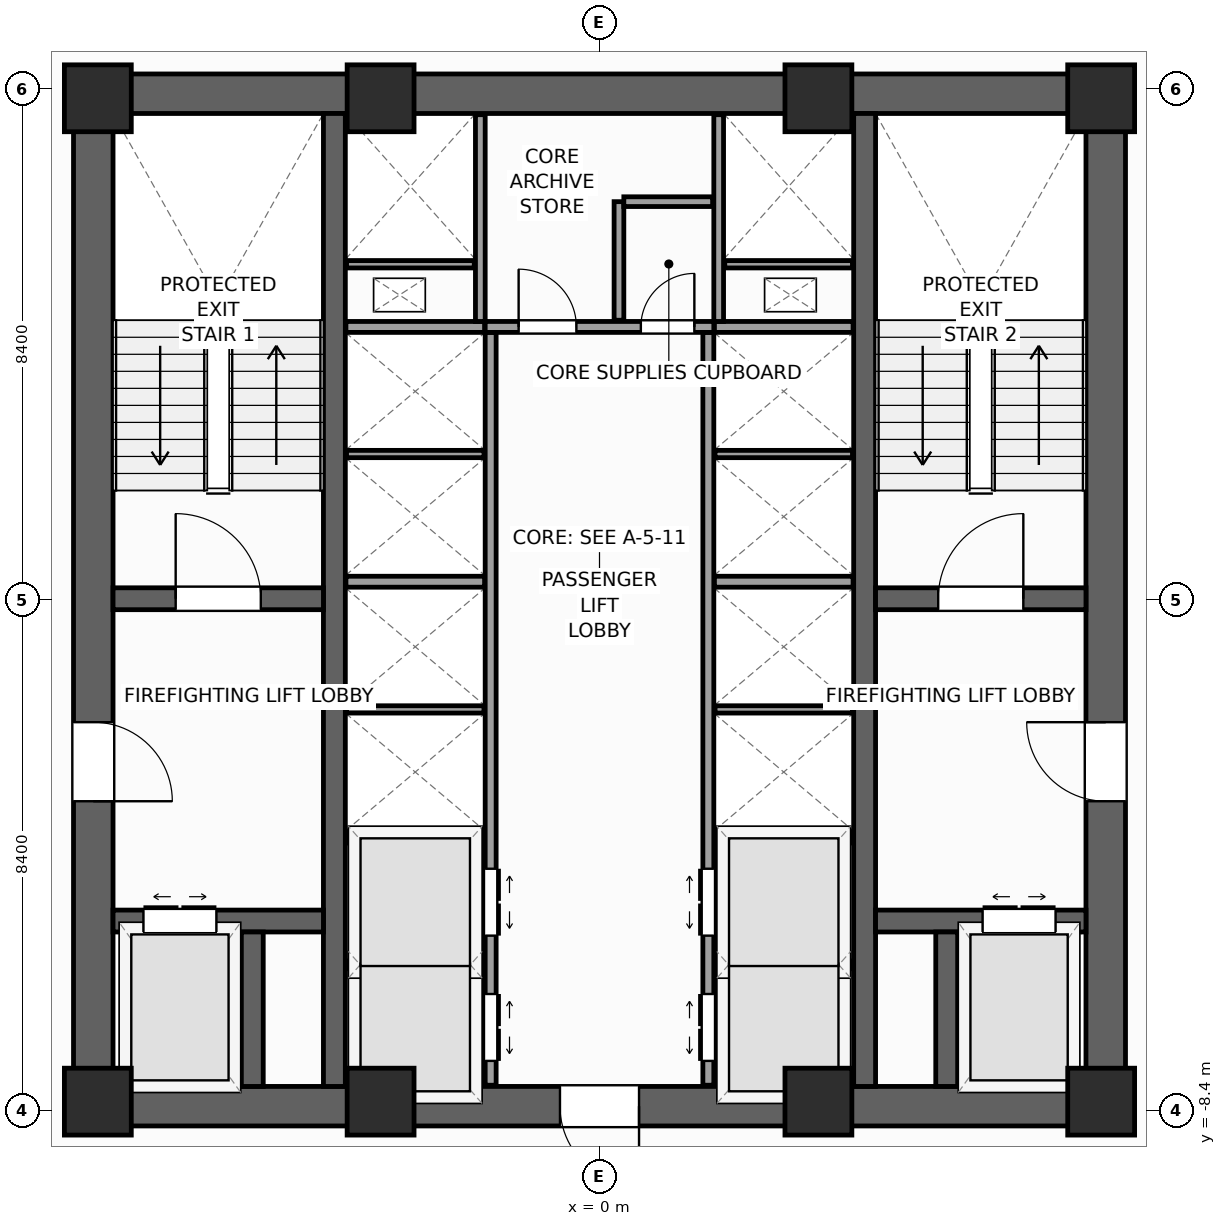
"""IFC4 building model, lengths in metres.
Left out: names, types, materials, properties, quantities, classifications, styles, units other than length and angle.
Written with IfcOpenShell. Run it as: python <this file> out.ifc"""

import sys

from ifc_helpers import new_model, si_unit, direction, frame, frame_2d, origin, origin_2d, place, context, subcontext, project, spatial, rectangle, extrude, source, transform, mapped, element, fill, save


model = new_model("IFC4")
c1 = context("Model", 3, precision=1e-05, world=origin(), true_north=direction((0.0, 1.0)))
c2 = subcontext(c1, "Body", "Model", "MODEL_VIEW")
j1 = project(units=[si_unit("LENGTHUNIT", "METRE"), si_unit("PLANEANGLEUNIT", "RADIAN")], contexts=[c1])
p1 = place(None, origin())
s1 = spatial("IfcSite", under=j1, at=p1, CompositionType="ELEMENT")
p2 = place(p1, origin())
s2 = spatial("IfcBuilding", under=s1, at=p2, CompositionType="ELEMENT")
p3 = place(p2, frame((0.0, 0.0, 95.2)))
s3 = spatial("IfcBuildingStorey", under=s2, at=p3, CompositionType="ELEMENT", Elevation=95.2)
p4 = place(p3, frame((-8.65, -8.325, 0.0), z_axis=(0.0, 0.0, 1.0), x_axis=(1.0, 0.0, 0.0)))
e1 = element("IfcWall", 1, at=p4, inside=s3, PredefinedType="SHEAR", context=c2, shape_type="SweptSolid", body=[
    extrude(rectangle(XDim=17.3, YDim=0.65, at=frame_2d((8.65, 0.0))), origin(), (0.0, 0.0, 1.0), 4.0),
])
p5 = place(p4, frame((8.0, 0.0, 0.0)))
e2 = element("IfcOpeningElement", 2, at=p5, cuts=e1, PredefinedType="OPENING", context=c2, shape_type="SweptSolid", body=[
    extrude(rectangle(XDim=1.3, YDim=2.2, at=frame_2d((0.65, 1.1))), frame((0.0, 0.335, 0.0), z_axis=(0.0, -1.0, 0.0), x_axis=(1.0, 0.0, 0.0)), (0.0, 0.0, 1.0), 0.67),
])
p6 = place(p3, frame((-8.65, 8.325, 0.0), z_axis=(0.0, 0.0, 1.0), x_axis=(1.0, 0.0, 0.0)))
e3 = element("IfcWall", 3, at=p6, inside=s3, PredefinedType="SHEAR", context=c2, shape_type="SweptSolid", body=[
    extrude(rectangle(XDim=17.3, YDim=0.65, at=frame_2d((8.65, 0.0))), origin(), (0.0, 0.0, 1.0), 4.0),
])
p7 = place(p3, frame((-8.325, -8.0, 0.0), z_axis=(0.0, 0.0, 1.0), x_axis=(0.0, 1.0, 0.0)))
e4 = element("IfcWall", 4, at=p7, inside=s3, PredefinedType="SHEAR", context=c2, shape_type="SweptSolid", body=[
    extrude(rectangle(XDim=16.0, YDim=0.65, at=frame_2d((8.0, 0.0))), origin(), (0.0, 0.0, 1.0), 4.0),
])
p8 = place(p7, frame((4.69, 0.0, 0.0)))
e5 = element("IfcOpeningElement", 5, at=p8, cuts=e4, PredefinedType="OPENING", context=c2, shape_type="SweptSolid", body=[
    extrude(rectangle(XDim=1.3, YDim=2.2, at=frame_2d((0.65, 1.1))), frame((0.0, 0.335, 0.0), z_axis=(0.0, -1.0, 0.0), x_axis=(1.0, 0.0, 0.0)), (0.0, 0.0, 1.0), 0.67),
])
p9 = place(p3, frame((8.325, -8.0, 0.0), z_axis=(0.0, 0.0, 1.0), x_axis=(0.0, 1.0, 0.0)))
e6 = element("IfcWall", 6, at=p9, inside=s3, PredefinedType="SHEAR", context=c2, shape_type="SweptSolid", body=[
    extrude(rectangle(XDim=16.0, YDim=0.65, at=frame_2d((8.0, 0.0))), origin(), (0.0, 0.0, 1.0), 4.0),
])
p10 = place(p9, frame((4.69, 0.0, 0.0)))
e7 = element("IfcOpeningElement", 7, at=p10, cuts=e6, PredefinedType="OPENING", context=c2, shape_type="SweptSolid", body=[
    extrude(rectangle(XDim=1.3, YDim=2.2, at=frame_2d((0.65, 1.1))), frame((0.0, 0.335, 0.0), z_axis=(0.0, -1.0, 0.0), x_axis=(1.0, 0.0, 0.0)), (0.0, 0.0, 1.0), 0.67),
])
for number, where, z_axis, x_axis in (
    (8, (-4.36, -8.0, 0.0), (0.0, 0.0, 1.0), (0.0, 1.0, 0.0)),
    (9, (4.36, -8.0, 0.0), (0.0, 0.0, 1.0), (0.0, 1.0, 0.0)),
):
    element("IfcWall", number, at=place(p3, frame(where, z_axis=z_axis, x_axis=x_axis)), inside=s3, PredefinedType="SHEAR", context=c2, shape_type="SweptSolid", body=[
        extrude(rectangle(XDim=16.0, YDim=0.36, at=frame_2d((8.0, 0.0))), origin(), (0.0, 0.0, 1.0), 4.0),
    ])
p11 = place(p3, frame((-8.0, 0.02, 0.0), z_axis=(0.0, 0.0, 1.0), x_axis=(1.0, 0.0, 0.0)))
e10 = element("IfcWall", 10, at=p11, inside=s3, PredefinedType="SHEAR", context=c2, shape_type="SweptSolid", body=[
    extrude(rectangle(XDim=3.46, YDim=0.36, at=frame_2d((1.73, 0.0))), origin(), (0.0, 0.0, 1.0), 4.0),
])
p12 = place(p11, frame((1.03, 0.0, 0.0)))
e11 = element("IfcOpeningElement", 11, at=p12, cuts=e10, PredefinedType="OPENING", context=c2, shape_type="SweptSolid", body=[
    extrude(rectangle(XDim=1.4, YDim=2.2, at=frame_2d((0.7, 1.1))), frame((0.0, 0.19, 0.0), z_axis=(0.0, -1.0, 0.0), x_axis=(1.0, 0.0, 0.0)), (0.0, 0.0, 1.0), 0.38),
])
p13 = place(p3, frame((4.54, 0.02, 0.0), z_axis=(0.0, 0.0, 1.0), x_axis=(1.0, 0.0, 0.0)))
e12 = element("IfcWall", 12, at=p13, inside=s3, PredefinedType="SHEAR", context=c2, shape_type="SweptSolid", body=[
    extrude(rectangle(XDim=3.46, YDim=0.36, at=frame_2d((1.73, 0.0))), origin(), (0.0, 0.0, 1.0), 4.0),
])
p14 = place(p13, frame((1.03, 0.0, 0.0)))
e13 = element("IfcOpeningElement", 13, at=p14, cuts=e12, PredefinedType="OPENING", context=c2, shape_type="SweptSolid", body=[
    extrude(rectangle(XDim=1.4, YDim=2.2, at=frame_2d((0.7, 1.1))), frame((0.0, 0.19, 0.0), z_axis=(0.0, -1.0, 0.0), x_axis=(1.0, 0.0, 0.0)), (0.0, 0.0, 1.0), 0.38),
])
p15 = place(p3, frame((-8.0, -5.28, 0.0), z_axis=(0.0, 0.0, 1.0), x_axis=(1.0, 0.0, 0.0)))
e14 = element("IfcWall", 14, at=p15, inside=s3, PredefinedType="SHEAR", context=c2, shape_type="SweptSolid", body=[
    extrude(rectangle(XDim=3.46, YDim=0.36, at=frame_2d((1.73, 0.0))), origin(), (0.0, 0.0, 1.0), 4.0),
])
p16 = place(p15, frame((0.5, 0.0, 0.0)))
e15 = element("IfcOpeningElement", 15, at=p16, cuts=e14, PredefinedType="OPENING", context=c2, shape_type="SweptSolid", body=[
    extrude(rectangle(XDim=1.2, YDim=2.25, at=frame_2d((0.6, 1.125))), frame((0.0, 0.19, 0.0), z_axis=(0.0, -1.0, 0.0), x_axis=(1.0, 0.0, 0.0)), (0.0, 0.0, 1.0), 0.38),
])
p17 = place(p3, frame((4.54, -5.28, 0.0), z_axis=(0.0, 0.0, 1.0), x_axis=(1.0, 0.0, 0.0)))
e16 = element("IfcWall", 16, at=p17, inside=s3, PredefinedType="SHEAR", context=c2, shape_type="SweptSolid", body=[
    extrude(rectangle(XDim=3.46, YDim=0.36, at=frame_2d((1.73, 0.0))), origin(), (0.0, 0.0, 1.0), 4.0),
])
p18 = place(p17, frame((1.76, 0.0, 0.0)))
e17 = element("IfcOpeningElement", 17, at=p18, cuts=e16, PredefinedType="OPENING", context=c2, shape_type="SweptSolid", body=[
    extrude(rectangle(XDim=1.2, YDim=2.25, at=frame_2d((0.6, 1.125))), frame((0.0, 0.19, 0.0), z_axis=(0.0, -1.0, 0.0), x_axis=(1.0, 0.0, 0.0)), (0.0, 0.0, 1.0), 0.38),
])
for number, where, z_axis, x_axis in (
    (18, (-5.71, -8.0, 0.0), (0.0, 0.0, 1.0), (0.0, 1.0, 0.0)),
    (19, (5.71, -8.0, 0.0), (0.0, 0.0, 1.0), (0.0, 1.0, 0.0)),
):
    element("IfcWall", number, at=place(p3, frame(where, z_axis=z_axis, x_axis=x_axis)), inside=s3, PredefinedType="SHEAR", context=c2, shape_type="SweptSolid", body=[
        extrude(rectangle(XDim=2.54, YDim=0.36, at=frame_2d((1.27, 0.0))), origin(), (0.0, 0.0, 1.0), 4.0),
    ])
m1 = source(origin(), c2, "Body", "SweptSolid", [
    extrude(rectangle(XDim=1.1, YDim=1.1, at=origin_2d()), origin(), (0.0, 0.0, 1.0), 4.0),
])
for number, where, z_axis, x_axis in (
    (20, (-8.25, -8.25, 0.0), (0.0, 0.0, 1.0), (1.0, 0.0, 0.0)),
    (21, (8.25, -8.25, 0.0), (0.0, 0.0, 1.0), (1.0, 0.0, 0.0)),
    (22, (8.25, 8.25, 0.0), (0.0, 0.0, 1.0), (1.0, 0.0, 0.0)),
    (23, (-8.25, 8.25, 0.0), (0.0, 0.0, 1.0), (1.0, 0.0, 0.0)),
    (24, (-3.6, -8.25, 0.0), (0.0, 0.0, 1.0), (1.0, 0.0, 0.0)),
    (25, (3.6, -8.25, 0.0), (0.0, 0.0, 1.0), (1.0, 0.0, 0.0)),
    (26, (-3.6, 8.25, 0.0), (0.0, 0.0, 1.0), (1.0, 0.0, 0.0)),
    (27, (3.6, 8.25, 0.0), (0.0, 0.0, 1.0), (1.0, 0.0, 0.0)),
):
    element("IfcColumn", number, at=place(p3, frame(where, z_axis=z_axis, x_axis=x_axis)), inside=s3, PredefinedType="PILASTER", context=c2, shape_type="MappedRepresentation", body=[
        mapped(m1, transform((0.0, 0.0, 0.0), scale=1.0)),
    ])
p19 = place(p3, frame((-1.79, -7.98, 0.0), z_axis=(0.0, 0.0, 1.0), x_axis=(0.0, 1.0, 0.0)))
e28 = element("IfcWall", 28, at=p19, inside=s3, PredefinedType="PARTITIONING", context=c2, shape_type="SweptSolid", body=[
    extrude(rectangle(XDim=12.38, YDim=0.18, at=frame_2d((6.19, 0.0))), origin(), (0.0, 0.0, 1.0), 3.74),
])
p20 = place(p19, frame((0.4, 0.0, 0.0)))
e29 = element("IfcOpeningElement", 29, at=p20, cuts=e28, PredefinedType="OPENING", context=c2, shape_type="SweptSolid", body=[
    extrude(rectangle(XDim=1.1, YDim=2.2, at=frame_2d((0.55, 1.1))), frame((0.0, 0.1, 0.0), z_axis=(0.0, -1.0, 0.0), x_axis=(1.0, 0.0, 0.0)), (0.0, 0.0, 1.0), 0.2),
])
p21 = place(p19, frame((2.46, 0.0, 0.0)))
e30 = element("IfcOpeningElement", 30, at=p21, cuts=e28, PredefinedType="OPENING", context=c2, shape_type="SweptSolid", body=[
    extrude(rectangle(XDim=1.1, YDim=2.2, at=frame_2d((0.55, 1.1))), frame((0.0, 0.1, 0.0), z_axis=(0.0, -1.0, 0.0), x_axis=(1.0, 0.0, 0.0)), (0.0, 0.0, 1.0), 0.2),
])
p22 = place(p3, frame((1.79, -7.98, 0.0), z_axis=(0.0, 0.0, 1.0), x_axis=(0.0, 1.0, 0.0)))
e31 = element("IfcWall", 31, at=p22, inside=s3, PredefinedType="PARTITIONING", context=c2, shape_type="SweptSolid", body=[
    extrude(rectangle(XDim=12.38, YDim=0.18, at=frame_2d((6.19, 0.0))), origin(), (0.0, 0.0, 1.0), 3.74),
])
p23 = place(p22, frame((0.4, 0.0, 0.0)))
e32 = element("IfcOpeningElement", 32, at=p23, cuts=e31, PredefinedType="OPENING", context=c2, shape_type="SweptSolid", body=[
    extrude(rectangle(XDim=1.1, YDim=2.2, at=frame_2d((0.55, 1.1))), frame((0.0, 0.1, 0.0), z_axis=(0.0, -1.0, 0.0), x_axis=(1.0, 0.0, 0.0)), (0.0, 0.0, 1.0), 0.2),
])
p24 = place(p22, frame((2.46, 0.0, 0.0)))
e33 = element("IfcOpeningElement", 33, at=p24, cuts=e31, PredefinedType="OPENING", context=c2, shape_type="SweptSolid", body=[
    extrude(rectangle(XDim=1.1, YDim=2.2, at=frame_2d((0.55, 1.1))), frame((0.0, 0.1, 0.0), z_axis=(0.0, -1.0, 0.0), x_axis=(1.0, 0.0, 0.0)), (0.0, 0.0, 1.0), 0.2),
])
p25 = place(p3, frame((-1.88, 4.49, 0.0), z_axis=(0.0, 0.0, 1.0), x_axis=(1.0, 0.0, 0.0)))
e34 = element("IfcWall", 34, at=p25, inside=s3, PredefinedType="PARTITIONING", context=c2, shape_type="SweptSolid", body=[
    extrude(rectangle(XDim=3.76, YDim=0.18, at=frame_2d((1.88, 0.0))), origin(), (0.0, 0.0, 1.0), 3.74),
])
p26 = place(p25, frame((0.55, 0.0, 0.0)))
e35 = element("IfcOpeningElement", 35, at=p26, cuts=e34, PredefinedType="OPENING", context=c2, shape_type="SweptSolid", body=[
    extrude(rectangle(XDim=0.95, YDim=2.1, at=frame_2d((0.475, 1.05))), frame((0.0, 0.1, 0.0), z_axis=(0.0, -1.0, 0.0), x_axis=(1.0, 0.0, 0.0)), (0.0, 0.0, 1.0), 0.2),
])
p27 = place(p25, frame((2.56, 0.0, 0.0)))
e36 = element("IfcOpeningElement", 36, at=p27, cuts=e34, PredefinedType="OPENING", context=c2, shape_type="SweptSolid", body=[
    extrude(rectangle(XDim=0.88, YDim=2.1, at=frame_2d((0.44, 1.05))), frame((0.0, 0.1, 0.0), z_axis=(0.0, -1.0, 0.0), x_axis=(1.0, 0.0, 0.0)), (0.0, 0.0, 1.0), 0.2),
])
for number, where, z_axis, x_axis in (
    (37, (-4.17, -3.9, 0.0), (0.0, 0.0, 1.0), (1.0, 0.0, 0.0)),
    (38, (1.89, -3.9, 0.0), (0.0, 0.0, 1.0), (1.0, 0.0, 0.0)),
    (39, (-4.17, 0.3, 0.0), (0.0, 0.0, 1.0), (1.0, 0.0, 0.0)),
    (40, (1.89, 0.3, 0.0), (0.0, 0.0, 1.0), (1.0, 0.0, 0.0)),
    (41, (-4.17, 4.49, 0.0), (0.0, 0.0, 1.0), (1.0, 0.0, 0.0)),
    (42, (1.89, 4.49, 0.0), (0.0, 0.0, 1.0), (1.0, 0.0, 0.0)),
):
    element("IfcWall", number, at=place(p3, frame(where, z_axis=z_axis, x_axis=x_axis)), inside=s3, PredefinedType="PARTITIONING", context=c2, shape_type="SweptSolid", body=[
        extrude(rectangle(XDim=2.28, YDim=0.18, at=frame_2d((1.14, 0.0))), origin(), (0.0, 0.0, 1.0), 3.74),
    ])
for number, where, z_axis, x_axis in (
    (43, (-4.16, -6.0, 0.0), (0.0, 0.0, 1.0), (1.0, 0.0, 0.0)),
    (44, (1.9, -6.0, 0.0), (0.0, 0.0, 1.0), (1.0, 0.0, 0.0)),
    (45, (-4.16, -1.8, 0.0), (0.0, 0.0, 1.0), (1.0, 0.0, 0.0)),
    (46, (1.9, -1.8, 0.0), (0.0, 0.0, 1.0), (1.0, 0.0, 0.0)),
    (47, (-4.16, 2.4, 0.0), (0.0, 0.0, 1.0), (1.0, 0.0, 0.0)),
    (48, (1.9, 2.4, 0.0), (0.0, 0.0, 1.0), (1.0, 0.0, 0.0)),
):
    element("IfcWall", number, at=place(p3, frame(where, z_axis=z_axis, x_axis=x_axis)), inside=s3, PredefinedType="PARTITIONING", context=c2, shape_type="SweptSolid", body=[
        extrude(rectangle(XDim=2.26, YDim=0.12, at=frame_2d((1.13, 0.0))), origin(), (0.0, 0.0, 1.0), 3.74),
    ])
for number, where, z_axis, x_axis in (
    (49, (-1.96, 4.58, 0.0), (0.0, 0.0, 1.0), (0.0, 1.0, 0.0)),
    (50, (1.96, 4.58, 0.0), (0.0, 0.0, 1.0), (0.0, 1.0, 0.0)),
):
    element("IfcWall", number, at=place(p3, frame(where, z_axis=z_axis, x_axis=x_axis)), inside=s3, PredefinedType="PARTITIONING", context=c2, shape_type="SweptSolid", body=[
        extrude(rectangle(XDim=3.4, YDim=0.16, at=frame_2d((1.7, 0.0))), origin(), (0.0, 0.0, 1.0), 3.74),
    ])
for number, where, z_axis, x_axis in (
    (51, (-4.16, 5.52, 0.0), (0.0, 0.0, 1.0), (1.0, 0.0, 0.0)),
    (52, (2.06, 5.52, 0.0), (0.0, 0.0, 1.0), (1.0, 0.0, 0.0)),
):
    element("IfcWall", number, at=place(p3, frame(where, z_axis=z_axis, x_axis=x_axis)), inside=s3, PredefinedType="PARTITIONING", context=c2, shape_type="SweptSolid", body=[
        extrude(rectangle(XDim=2.1, YDim=0.12, at=frame_2d((1.05, 0.0))), origin(), (0.0, 0.0, 1.0), 3.74),
    ])
p28 = place(p3, frame((0.32, 4.6, 0.0), z_axis=(0.0, 0.0, 1.0), x_axis=(0.0, 1.0, 0.0)))
e53 = element("IfcWall", 53, at=p28, inside=s3, PredefinedType="PARTITIONING", context=c2, shape_type="SweptSolid", body=[
    extrude(rectangle(XDim=1.95, YDim=0.16, at=frame_2d((0.975, 0.0))), origin(), (0.0, 0.0, 1.0), 3.74),
])
p29 = place(p3, frame((0.4, 6.55, 0.0), z_axis=(0.0, 0.0, 1.0), x_axis=(1.0, 0.0, 0.0)))
e54 = element("IfcWall", 54, at=p29, inside=s3, PredefinedType="PARTITIONING", context=c2, shape_type="SweptSolid", body=[
    extrude(rectangle(XDim=1.46, YDim=0.16, at=frame_2d((0.73, 0.0))), origin(), (0.0, 0.0, 1.0), 3.74),
])
m2 = source(origin(), c2, "Body", "SweptSolid", [
    extrude(rectangle(XDim=1.4, YDim=2.2, at=frame_2d((0.7, 1.1))), frame((0.0, 0.025, 0.0), z_axis=(0.0, -1.0, 0.0), x_axis=(1.0, 0.0, 0.0)), (0.0, 0.0, 1.0), 0.05),
])
p30 = place(p12, origin())
e55 = element("IfcDoor", 55, at=p30, inside=s3, OperationType="SINGLE_SWING_LEFT", PredefinedType="DOOR", context=c2, shape_type="MappedRepresentation", body=[
    mapped(m2, transform((0.0, 0.0, 0.0), scale=1.0)),
])
fill(e11, e55)
p31 = place(p14, origin())
e56 = element("IfcDoor", 56, at=p31, inside=s3, OperationType="SINGLE_SWING_RIGHT", PredefinedType="DOOR", context=c2, shape_type="MappedRepresentation", body=[
    mapped(m2, transform((0.0, 0.0, 0.0), scale=1.0)),
])
fill(e13, e56)
m3 = source(origin(), c2, "Body", "SweptSolid", [
    extrude(rectangle(XDim=1.3, YDim=2.2, at=frame_2d((0.65, 1.1))), frame((0.0, 0.025, 0.0), z_axis=(0.0, -1.0, 0.0), x_axis=(1.0, 0.0, 0.0)), (0.0, 0.0, 1.0), 0.05),
])
p32 = place(p8, frame((1.3, 0.0, 0.0), z_axis=(0.0, 0.0, 1.0), x_axis=(-1.0, 0.0, 0.0)))
e57 = element("IfcDoor", 57, at=p32, inside=s3, OperationType="SINGLE_SWING_LEFT", PredefinedType="DOOR", context=c2, shape_type="MappedRepresentation", body=[
    mapped(m3, transform((0.0, 0.0, 0.0), scale=1.0)),
])
fill(e5, e57)
p33 = place(p10, origin())
e58 = element("IfcDoor", 58, at=p33, inside=s3, OperationType="SINGLE_SWING_RIGHT", PredefinedType="DOOR", context=c2, shape_type="MappedRepresentation", body=[
    mapped(m3, transform((0.0, 0.0, 0.0), scale=1.0)),
])
fill(e7, e58)
p34 = place(p5, frame((1.3, 0.0, 0.0), z_axis=(0.0, 0.0, 1.0), x_axis=(-1.0, 0.0, 0.0)))
e59 = element("IfcDoor", 59, at=p34, inside=s3, OperationType="SINGLE_SWING_RIGHT", PredefinedType="DOOR", context=c2, shape_type="MappedRepresentation", body=[
    mapped(m3, transform((0.0, 0.0, 0.0), scale=1.0)),
])
fill(e2, e59)
m4 = source(origin(), c2, "Body", "SweptSolid", [
    extrude(rectangle(XDim=1.2, YDim=2.25, at=frame_2d((0.6, 1.125))), frame((0.0, 0.025, 0.0), z_axis=(0.0, -1.0, 0.0), x_axis=(1.0, 0.0, 0.0)), (0.0, 0.0, 1.0), 0.05),
])
p35 = place(p16, origin())
e60 = element("IfcDoor", 60, at=p35, inside=s3, OperationType="DOUBLE_DOOR_SLIDING", PredefinedType="DOOR", context=c2, shape_type="MappedRepresentation", body=[
    mapped(m4, transform((0.0, 0.0, 0.0), scale=1.0)),
])
fill(e15, e60)
p36 = place(p18, origin())
e61 = element("IfcDoor", 61, at=p36, inside=s3, OperationType="DOUBLE_DOOR_SLIDING", PredefinedType="DOOR", context=c2, shape_type="MappedRepresentation", body=[
    mapped(m4, transform((0.0, 0.0, 0.0), scale=1.0)),
])
fill(e17, e61)
m5 = source(origin(), c2, "Body", "SweptSolid", [
    extrude(rectangle(XDim=1.1, YDim=2.2, at=frame_2d((0.55, 1.1))), frame((0.0, 0.025, 0.0), z_axis=(0.0, -1.0, 0.0), x_axis=(1.0, 0.0, 0.0)), (0.0, 0.0, 1.0), 0.05),
])
p37 = place(p20, frame((1.1, 0.0, 0.0), z_axis=(0.0, 0.0, 1.0), x_axis=(-1.0, 0.0, 0.0)))
e62 = element("IfcDoor", 62, at=p37, inside=s3, OperationType="DOUBLE_DOOR_SLIDING", PredefinedType="DOOR", context=c2, shape_type="MappedRepresentation", body=[
    mapped(m5, transform((0.0, 0.0, 0.0), scale=1.0)),
])
fill(e29, e62)
p38 = place(p21, frame((1.1, 0.0, 0.0), z_axis=(0.0, 0.0, 1.0), x_axis=(-1.0, 0.0, 0.0)))
e63 = element("IfcDoor", 63, at=p38, inside=s3, OperationType="DOUBLE_DOOR_SLIDING", PredefinedType="DOOR", context=c2, shape_type="MappedRepresentation", body=[
    mapped(m5, transform((0.0, 0.0, 0.0), scale=1.0)),
])
fill(e30, e63)
p39 = place(p23, origin())
e64 = element("IfcDoor", 64, at=p39, inside=s3, OperationType="DOUBLE_DOOR_SLIDING", PredefinedType="DOOR", context=c2, shape_type="MappedRepresentation", body=[
    mapped(m5, transform((0.0, 0.0, 0.0), scale=1.0)),
])
fill(e32, e64)
p40 = place(p24, origin())
e65 = element("IfcDoor", 65, at=p40, inside=s3, OperationType="DOUBLE_DOOR_SLIDING", PredefinedType="DOOR", context=c2, shape_type="MappedRepresentation", body=[
    mapped(m5, transform((0.0, 0.0, 0.0), scale=1.0)),
])
fill(e33, e65)
m6 = source(origin(), c2, "Body", "SweptSolid", [
    extrude(rectangle(XDim=0.95, YDim=2.1, at=frame_2d((0.475, 1.05))), frame((0.0, 0.025, 0.0), z_axis=(0.0, -1.0, 0.0), x_axis=(1.0, 0.0, 0.0)), (0.0, 0.0, 1.0), 0.05),
])
p41 = place(p26, origin())
e66 = element("IfcDoor", 66, at=p41, inside=s3, OperationType="SINGLE_SWING_LEFT", PredefinedType="DOOR", context=c2, shape_type="MappedRepresentation", body=[
    mapped(m6, transform((0.0, 0.0, 0.0), scale=1.0)),
])
fill(e35, e66)
m7 = source(origin(), c2, "Body", "SweptSolid", [
    extrude(rectangle(XDim=0.88, YDim=2.1, at=frame_2d((0.44, 1.05))), frame((0.0, 0.025, 0.0), z_axis=(0.0, -1.0, 0.0), x_axis=(1.0, 0.0, 0.0)), (0.0, 0.0, 1.0), 0.05),
])
p42 = place(p27, origin())
e67 = element("IfcDoor", 67, at=p42, inside=s3, OperationType="SINGLE_SWING_RIGHT", PredefinedType="DOOR", context=c2, shape_type="MappedRepresentation", body=[
    mapped(m7, transform((0.0, 0.0, 0.0), scale=1.0)),
])
fill(e36, e67)
save(model, sys.argv[1])
